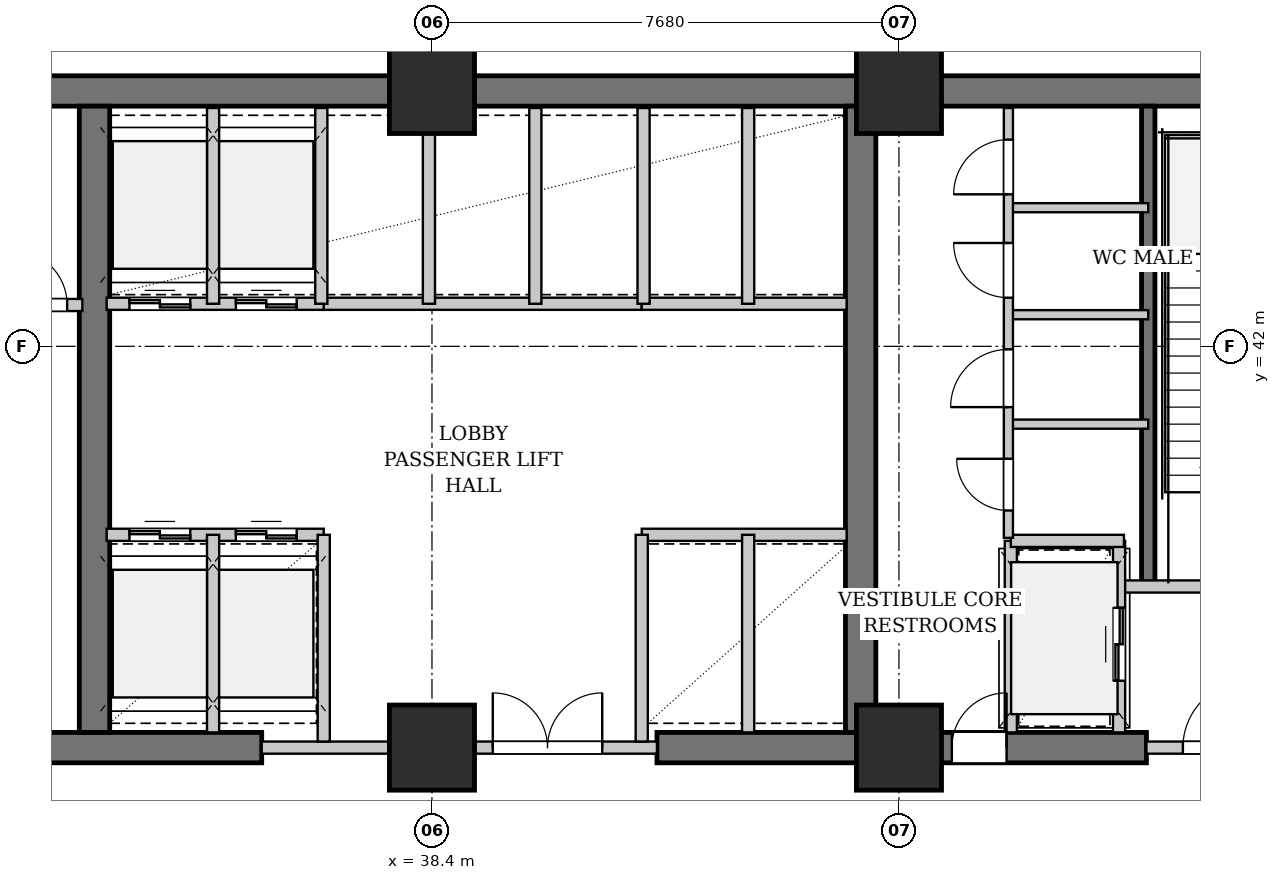
"""IFC4 building model, lengths in metres.
Left out: names, types, materials, properties, quantities, classifications, styles, units other than length and angle.
Written with IfcOpenShell. Run it as: python <this file> out.ifc"""

import sys

from ifc_helpers import new_model, si_unit, direction, frame, frame_2d, origin, origin_2d, place, context, subcontext, project, spatial, rectangle, extrude, element, fill, save


model = new_model("IFC4")
c1 = context("Model", 3, precision=1e-05, world=origin(), true_north=direction((0.0, 1.0)))
c2 = subcontext(c1, "Body", "Model", "MODEL_VIEW")
j1 = project(units=[si_unit("LENGTHUNIT", "METRE"), si_unit("PLANEANGLEUNIT", "RADIAN")], contexts=[c1])
p1 = place(None, origin())
s1 = spatial("IfcSite", under=j1, at=p1, CompositionType="ELEMENT")
p2 = place(p1, origin())
s2 = spatial("IfcBuilding", under=s1, at=p2, CompositionType="ELEMENT")
p3 = place(p2, frame((0.0, 0.0, 25.2)))
s3 = spatial("IfcBuildingStorey", under=s2, at=p3, CompositionType="ELEMENT", Elevation=25.2)
p4 = place(p3, frame((22.79, 46.2, 0.0), z_axis=(0.0, 0.0, 1.0), x_axis=(1.0, 0.0, 0.0)))
e1 = element("IfcWall", 1, at=p4, inside=s3, PredefinedType="SHEAR", context=c2, shape_type="SweptSolid", body=[
    extrude(rectangle(XDim=31.22, YDim=0.5, at=frame_2d((15.61, 0.0))), origin(), (0.0, 0.0, 1.0), 4.78),
])
p5 = place(p3, frame((30.72, 35.4, 0.0), z_axis=(0.0, 0.0, 1.0), x_axis=(1.0, 0.0, 0.0)))
e2 = element("IfcWall", 2, at=p5, inside=s3, PredefinedType="SHEAR", context=c2, shape_type="SweptSolid", body=[
    extrude(rectangle(XDim=4.88, YDim=0.5, at=frame_2d((2.44, 0.0))), origin(), (0.0, 0.0, 1.0), 4.78),
])
p6 = place(p3, frame((42.1, 35.4, 0.0), z_axis=(0.0, 0.0, 1.0), x_axis=(1.0, 0.0, 0.0)))
e3 = element("IfcWall", 3, at=p6, inside=s3, PredefinedType="SHEAR", context=c2, shape_type="SweptSolid", body=[
    extrude(rectangle(XDim=8.05, YDim=0.5, at=frame_2d((4.025, 0.0))), origin(), (0.0, 0.0, 1.0), 4.78),
])
p7 = place(p6, frame((4.85, 0.0, 0.0)))
e4 = element("IfcOpeningElement", 4, at=p7, cuts=e3, PredefinedType="OPENING", context=c2, shape_type="SweptSolid", body=[
    extrude(rectangle(XDim=0.9, YDim=2.15, at=frame_2d((0.45, 1.075))), frame((0.0, 0.26, 0.0), z_axis=(0.0, -1.0, 0.0), x_axis=(1.0, 0.0, 0.0)), (0.0, 0.0, 1.0), 0.52),
])
for number, where, z_axis, x_axis in (
    (5, (32.85, 35.65, 0.0), (0.0, 0.0, 1.0), (0.0, 1.0, 0.0)),
    (6, (45.45, 35.65, 0.0), (0.0, 0.0, 1.0), (0.0, 1.0, 0.0)),
):
    element("IfcWall", number, at=place(p3, frame(where, z_axis=z_axis, x_axis=x_axis)), inside=s3, PredefinedType="SHEAR", context=c2, shape_type="SweptSolid", body=[
        extrude(rectangle(XDim=10.3, YDim=0.5, at=frame_2d((5.15, 0.0))), origin(), (0.0, 0.0, 1.0), 4.78),
    ])
p8 = place(p3, frame((50.18, 38.05, 0.0), z_axis=(0.0, 0.0, 1.0), x_axis=(0.0, 1.0, 0.0)))
e7 = element("IfcWall", 7, at=p8, inside=s3, PredefinedType="SHEAR", context=c2, shape_type="SweptSolid", body=[
    extrude(rectangle(XDim=7.9, YDim=0.22, at=frame_2d((3.95, 0.0))), origin(), (0.0, 0.0, 1.0), 4.78),
])
for number, where, z_axis, x_axis in (
    (8, (38.4, 35.4, 0.0), (0.0, 0.0, 1.0), (1.0, 0.0, 0.0)),
    (9, (38.4, 46.2, 0.0), (0.0, 0.0, 1.0), (1.0, 0.0, 0.0)),
    (10, (46.08, 35.4, 0.0), (0.0, 0.0, 1.0), (1.0, 0.0, 0.0)),
    (11, (46.08, 46.2, 0.0), (0.0, 0.0, 1.0), (1.0, 0.0, 0.0)),
):
    element("IfcColumn", number, at=place(p3, frame(where, z_axis=z_axis, x_axis=x_axis)), inside=s3, PredefinedType="COLUMN", context=c2, shape_type="SweptSolid", body=[
        extrude(rectangle(XDim=1.4, YDim=1.4, at=origin_2d()), origin(), (0.0, 0.0, 1.0), 5.2),
    ])
p9 = place(p3, frame((27.32, 42.68, 0.0), z_axis=(0.0, 0.0, 1.0), x_axis=(1.0, 0.0, 0.0)))
e12 = element("IfcWall", 12, at=p9, inside=s3, PredefinedType="PARTITIONING", context=c2, shape_type="SweptSolid", body=[
    extrude(rectangle(XDim=5.33, YDim=0.2, at=frame_2d((2.665, 0.0))), origin(), (0.0, 0.0, 1.0), 4.78),
])
p10 = place(p9, frame((4.18, 0.0, 0.0)))
e13 = element("IfcOpeningElement", 13, at=p10, cuts=e12, PredefinedType="OPENING", context=c2, shape_type="SweptSolid", body=[
    extrude(rectangle(XDim=0.9, YDim=2.15, at=frame_2d((0.45, 1.075))), frame((0.0, 0.11, 0.0), z_axis=(0.0, -1.0, 0.0), x_axis=(1.0, 0.0, 0.0)), (0.0, 0.0, 1.0), 0.22),
])
p11 = place(p3, frame((35.6, 35.4, 0.0), z_axis=(0.0, 0.0, 1.0), x_axis=(1.0, 0.0, 0.0)))
e14 = element("IfcWall", 14, at=p11, inside=s3, PredefinedType="PARTITIONING", context=c2, shape_type="SweptSolid", body=[
    extrude(rectangle(XDim=6.5, YDim=0.2, at=frame_2d((3.25, 0.0))), origin(), (0.0, 0.0, 1.0), 3.767),
])
p12 = place(p11, frame((3.8, 0.0, 0.0)))
e15 = element("IfcOpeningElement", 15, at=p12, cuts=e14, PredefinedType="OPENING", context=c2, shape_type="SweptSolid", body=[
    extrude(rectangle(XDim=1.8, YDim=2.3, at=frame_2d((0.9, 1.15))), frame((0.0, 0.11, 0.0), z_axis=(0.0, -1.0, 0.0), x_axis=(1.0, 0.0, 0.0)), (0.0, 0.0, 1.0), 0.22),
])
p13 = place(p3, frame((36.6, 42.7, 0.0), z_axis=(0.0, 0.0, 1.0), x_axis=(1.0, 0.0, 0.0)))
e16 = element("IfcWall", 16, at=p13, inside=s3, PredefinedType="PARTITIONING", context=c2, shape_type="SweptSolid", body=[
    extrude(rectangle(XDim=5.25, YDim=0.2, at=frame_2d((2.625, 0.0))), origin(), (0.0, 0.0, 1.0), 4.78),
])
p14 = place(p3, frame((38.35, 42.7, 0.0), z_axis=(0.0, 0.0, 1.0), x_axis=(0.0, 1.0, 0.0)))
e17 = element("IfcWall", 17, at=p14, inside=s3, PredefinedType="PARTITIONING", context=c2, shape_type="SweptSolid", body=[
    extrude(rectangle(XDim=3.22, YDim=0.2, at=frame_2d((1.61, 0.0))), origin(), (0.0, 0.0, 1.0), 3.767),
])
p15 = place(p3, frame((40.1, 42.7, 0.0), z_axis=(0.0, 0.0, 1.0), x_axis=(0.0, 1.0, 0.0)))
e18 = element("IfcWall", 18, at=p15, inside=s3, PredefinedType="PARTITIONING", context=c2, shape_type="SweptSolid", body=[
    extrude(rectangle(XDim=3.22, YDim=0.2, at=frame_2d((1.61, 0.0))), origin(), (0.0, 0.0, 1.0), 4.78),
])
p16 = place(p3, frame((33.05, 38.9, 0.0), z_axis=(0.0, 0.0, 1.0), x_axis=(1.0, 0.0, 0.0)))
e19 = element("IfcWall", 19, at=p16, inside=s3, PredefinedType="PARTITIONING", context=c2, shape_type="SweptSolid", body=[
    extrude(rectangle(XDim=3.57, YDim=0.2, at=frame_2d((1.785, 0.0))), origin(), (0.0, 0.0, 1.0), 4.78),
])
p17 = place(p16, frame((0.375, 0.0, 0.0)))
e20 = element("IfcOpeningElement", 20, at=p17, cuts=e19, PredefinedType="OPENING", context=c2, shape_type="SweptSolid", body=[
    extrude(rectangle(XDim=1.0, YDim=2.2, at=frame_2d((0.5, 1.1))), frame((0.0, 0.11, 0.0), z_axis=(0.0, -1.0, 0.0), x_axis=(1.0, 0.0, 0.0)), (0.0, 0.0, 1.0), 0.22),
])
p18 = place(p16, frame((2.125, 0.0, 0.0)))
e21 = element("IfcOpeningElement", 21, at=p18, cuts=e19, PredefinedType="OPENING", context=c2, shape_type="SweptSolid", body=[
    extrude(rectangle(XDim=1.0, YDim=2.2, at=frame_2d((0.5, 1.1))), frame((0.0, 0.11, 0.0), z_axis=(0.0, -1.0, 0.0), x_axis=(1.0, 0.0, 0.0)), (0.0, 0.0, 1.0), 0.22),
])
p19 = place(p3, frame((33.05, 42.7, 0.0), z_axis=(0.0, 0.0, 1.0), x_axis=(1.0, 0.0, 0.0)))
e22 = element("IfcWall", 22, at=p19, inside=s3, PredefinedType="PARTITIONING", context=c2, shape_type="SweptSolid", body=[
    extrude(rectangle(XDim=3.57, YDim=0.2, at=frame_2d((1.785, 0.0))), origin(), (0.0, 0.0, 1.0), 4.78),
])
p20 = place(p19, frame((0.375, 0.0, 0.0)))
e23 = element("IfcOpeningElement", 23, at=p20, cuts=e22, PredefinedType="OPENING", context=c2, shape_type="SweptSolid", body=[
    extrude(rectangle(XDim=1.0, YDim=2.2, at=frame_2d((0.5, 1.1))), frame((0.0, 0.11, 0.0), z_axis=(0.0, -1.0, 0.0), x_axis=(1.0, 0.0, 0.0)), (0.0, 0.0, 1.0), 0.22),
])
p21 = place(p19, frame((2.125, 0.0, 0.0)))
e24 = element("IfcOpeningElement", 24, at=p21, cuts=e22, PredefinedType="OPENING", context=c2, shape_type="SweptSolid", body=[
    extrude(rectangle(XDim=1.0, YDim=2.2, at=frame_2d((0.5, 1.1))), frame((0.0, 0.11, 0.0), z_axis=(0.0, -1.0, 0.0), x_axis=(1.0, 0.0, 0.0)), (0.0, 0.0, 1.0), 0.22),
])
p22 = place(p3, frame((34.8, 35.65, 0.0), z_axis=(0.0, 0.0, 1.0), x_axis=(0.0, 1.0, 0.0)))
e25 = element("IfcWall", 25, at=p22, inside=s3, PredefinedType="PARTITIONING", context=c2, shape_type="SweptSolid", body=[
    extrude(rectangle(XDim=3.25, YDim=0.2, at=frame_2d((1.625, 0.0))), origin(), (0.0, 0.0, 1.0), 4.78),
])
p23 = place(p3, frame((34.8, 42.7, 0.0), z_axis=(0.0, 0.0, 1.0), x_axis=(0.0, 1.0, 0.0)))
e26 = element("IfcWall", 26, at=p23, inside=s3, PredefinedType="PARTITIONING", context=c2, shape_type="SweptSolid", body=[
    extrude(rectangle(XDim=3.22, YDim=0.2, at=frame_2d((1.61, 0.0))), origin(), (0.0, 0.0, 1.0), 4.78),
])
p24 = place(p3, frame((36.62, 35.5, 0.0), z_axis=(0.0, 0.0, 1.0), x_axis=(0.0, 1.0, 0.0)))
e27 = element("IfcWall", 27, at=p24, inside=s3, PredefinedType="PARTITIONING", context=c2, shape_type="SweptSolid", body=[
    extrude(rectangle(XDim=3.4, YDim=0.2, at=frame_2d((1.7, 0.0))), origin(), (0.0, 0.0, 1.0), 4.78),
])
p25 = place(p3, frame((36.58, 42.7, 0.0), z_axis=(0.0, 0.0, 1.0), x_axis=(0.0, 1.0, 0.0)))
e28 = element("IfcWall", 28, at=p25, inside=s3, PredefinedType="PARTITIONING", context=c2, shape_type="SweptSolid", body=[
    extrude(rectangle(XDim=3.22, YDim=0.2, at=frame_2d((1.61, 0.0))), origin(), (0.0, 0.0, 1.0), 4.78),
])
for number, where, z_axis, x_axis in (
    (29, (41.85, 38.9, 0.0), (0.0, 0.0, 1.0), (1.0, 0.0, 0.0)),
    (30, (41.85, 42.7, 0.0), (0.0, 0.0, 1.0), (1.0, 0.0, 0.0)),
):
    element("IfcWall", number, at=place(p3, frame(where, z_axis=z_axis, x_axis=x_axis)), inside=s3, PredefinedType="PARTITIONING", context=c2, shape_type="SweptSolid", body=[
        extrude(rectangle(XDim=3.37, YDim=0.2, at=frame_2d((1.685, 0.0))), origin(), (0.0, 0.0, 1.0), 4.78),
    ])
p26 = place(p3, frame((43.6, 35.65, 0.0), z_axis=(0.0, 0.0, 1.0), x_axis=(0.0, 1.0, 0.0)))
e31 = element("IfcWall", 31, at=p26, inside=s3, PredefinedType="PARTITIONING", context=c2, shape_type="SweptSolid", body=[
    extrude(rectangle(XDim=3.25, YDim=0.2, at=frame_2d((1.625, 0.0))), origin(), (0.0, 0.0, 1.0), 4.78),
])
p27 = place(p3, frame((43.6, 42.7, 0.0), z_axis=(0.0, 0.0, 1.0), x_axis=(0.0, 1.0, 0.0)))
e32 = element("IfcWall", 32, at=p27, inside=s3, PredefinedType="PARTITIONING", context=c2, shape_type="SweptSolid", body=[
    extrude(rectangle(XDim=3.22, YDim=0.2, at=frame_2d((1.61, 0.0))), origin(), (0.0, 0.0, 1.0), 4.78),
])
p28 = place(p3, frame((41.85, 35.5, 0.0), z_axis=(0.0, 0.0, 1.0), x_axis=(0.0, 1.0, 0.0)))
e33 = element("IfcWall", 33, at=p28, inside=s3, PredefinedType="PARTITIONING", context=c2, shape_type="SweptSolid", body=[
    extrude(rectangle(XDim=3.4, YDim=0.2, at=frame_2d((1.7, 0.0))), origin(), (0.0, 0.0, 1.0), 4.78),
])
p29 = place(p3, frame((41.88, 42.7, 0.0), z_axis=(0.0, 0.0, 1.0), x_axis=(0.0, 1.0, 0.0)))
e34 = element("IfcWall", 34, at=p29, inside=s3, PredefinedType="PARTITIONING", context=c2, shape_type="SweptSolid", body=[
    extrude(rectangle(XDim=3.22, YDim=0.2, at=frame_2d((1.61, 0.0))), origin(), (0.0, 0.0, 1.0), 4.78),
])
p30 = place(p3, frame((49.78, 38.05, 0.0), z_axis=(0.0, 0.0, 1.0), x_axis=(1.0, 0.0, 0.0)))
e35 = element("IfcWall", 35, at=p30, inside=s3, PredefinedType="PARTITIONING", context=c2, shape_type="SweptSolid", body=[
    extrude(rectangle(XDim=3.72, YDim=0.2, at=frame_2d((1.86, 0.0))), origin(), (0.0, 0.0, 1.0), 4.78),
])
p31 = place(p30, frame((1.436, 0.0, 0.0)))
e36 = element("IfcOpeningElement", 36, at=p31, cuts=e35, PredefinedType="OPENING", context=c2, shape_type="SweptSolid", body=[
    extrude(rectangle(XDim=1.1, YDim=2.15, at=frame_2d((0.55, 1.075))), frame((0.0, 0.11, 0.0), z_axis=(0.0, -1.0, 0.0), x_axis=(1.0, 0.0, 0.0)), (0.0, 0.0, 1.0), 0.22),
])
p32 = place(p3, frame((50.15, 35.4, 0.0), z_axis=(0.0, 0.0, 1.0), x_axis=(1.0, 0.0, 0.0)))
e37 = element("IfcWall", 37, at=p32, inside=s3, PredefinedType="PARTITIONING", context=c2, shape_type="SweptSolid", body=[
    extrude(rectangle(XDim=2.3, YDim=0.2, at=frame_2d((1.15, 0.0))), origin(), (0.0, 0.0, 1.0), 3.767),
])
p33 = place(p32, frame((0.6, 0.0, 0.0)))
e38 = element("IfcOpeningElement", 38, at=p33, cuts=e37, PredefinedType="OPENING", context=c2, shape_type="SweptSolid", body=[
    extrude(rectangle(XDim=1.1, YDim=2.15, at=frame_2d((0.55, 1.075))), frame((0.0, 0.11, 0.0), z_axis=(0.0, -1.0, 0.0), x_axis=(1.0, 0.0, 0.0)), (0.0, 0.0, 1.0), 0.22),
])
p34 = place(p3, frame((49.7, 35.65, 0.0), z_axis=(0.0, 0.0, 1.0), x_axis=(0.0, 1.0, 0.0)))
e39 = element("IfcWall", 39, at=p34, inside=s3, PredefinedType="PARTITIONING", context=c2, shape_type="SweptSolid", body=[
    extrude(rectangle(XDim=3.15, YDim=0.2, at=frame_2d((1.575, 0.0))), origin(), (0.0, 0.0, 1.0), 4.78),
])
p35 = place(p34, frame((0.85, 0.0, 0.0)))
e40 = element("IfcOpeningElement", 40, at=p35, cuts=e39, PredefinedType="OPENING", context=c2, shape_type="SweptSolid", body=[
    extrude(rectangle(XDim=1.2, YDim=2.2, at=frame_2d((0.6, 1.1))), frame((0.0, 0.11, 0.0), z_axis=(0.0, -1.0, 0.0), x_axis=(1.0, 0.0, 0.0)), (0.0, 0.0, 1.0), 0.22),
])
p36 = place(p3, frame((47.92, 35.65, 0.0), z_axis=(0.0, 0.0, 1.0), x_axis=(0.0, 1.0, 0.0)))
e41 = element("IfcWall", 41, at=p36, inside=s3, PredefinedType="PARTITIONING", context=c2, shape_type="SweptSolid", body=[
    extrude(rectangle(XDim=3.15, YDim=0.2, at=frame_2d((1.575, 0.0))), origin(), (0.0, 0.0, 1.0), 4.78),
])
p37 = place(p3, frame((47.92, 38.8, 0.0), z_axis=(0.0, 0.0, 1.0), x_axis=(1.0, 0.0, 0.0)))
e42 = element("IfcWall", 42, at=p37, inside=s3, PredefinedType="PARTITIONING", context=c2, shape_type="SweptSolid", body=[
    extrude(rectangle(XDim=1.86, YDim=0.2, at=frame_2d((0.93, 0.0))), origin(), (0.0, 0.0, 1.0), 4.78),
])
for number, where, z_axis, x_axis in (
    (43, (47.88, 40.72, 0.0), (0.0, 0.0, 1.0), (1.0, 0.0, 0.0)),
    (44, (47.88, 42.52, 0.0), (0.0, 0.0, 1.0), (1.0, 0.0, 0.0)),
    (45, (47.88, 44.28, 0.0), (0.0, 0.0, 1.0), (1.0, 0.0, 0.0)),
):
    element("IfcWall", number, at=place(p3, frame(where, z_axis=z_axis, x_axis=x_axis)), inside=s3, PredefinedType="PARTITIONING", context=c2, shape_type="SweptSolid", body=[
        extrude(rectangle(XDim=2.3, YDim=0.15, at=frame_2d((1.15, 0.0))), origin(), (0.0, 0.0, 1.0), 4.78),
    ])
p38 = place(p3, frame((47.88, 38.85, 0.0), z_axis=(0.0, 0.0, 1.0), x_axis=(0.0, 1.0, 0.0)))
e46 = element("IfcWall", 46, at=p38, inside=s3, PredefinedType="PARTITIONING", context=c2, shape_type="SweptSolid", body=[
    extrude(rectangle(XDim=7.07, YDim=0.15, at=frame_2d((3.535, 0.0))), origin(), (0.0, 0.0, 1.0), 4.78),
])
p39 = place(p38, frame((0.45, 0.0, 0.0)))
e47 = element("IfcOpeningElement", 47, at=p39, cuts=e46, PredefinedType="OPENING", context=c2, shape_type="SweptSolid", body=[
    extrude(rectangle(XDim=0.85, YDim=2.15, at=frame_2d((0.425, 1.075))), frame((0.0, 0.085, 0.0), z_axis=(0.0, -1.0, 0.0), x_axis=(1.0, 0.0, 0.0)), (0.0, 0.0, 1.0), 0.17),
])
p40 = place(p38, frame((2.15, 0.0, 0.0)))
e48 = element("IfcOpeningElement", 48, at=p40, cuts=e46, PredefinedType="OPENING", context=c2, shape_type="SweptSolid", body=[
    extrude(rectangle(XDim=0.95, YDim=2.15, at=frame_2d((0.475, 1.075))), frame((0.0, 0.085, 0.0), z_axis=(0.0, -1.0, 0.0), x_axis=(1.0, 0.0, 0.0)), (0.0, 0.0, 1.0), 0.17),
])
p41 = place(p38, frame((3.95, 0.0, 0.0)))
e49 = element("IfcOpeningElement", 49, at=p41, cuts=e46, PredefinedType="OPENING", context=c2, shape_type="SweptSolid", body=[
    extrude(rectangle(XDim=0.9, YDim=2.15, at=frame_2d((0.45, 1.075))), frame((0.0, 0.085, 0.0), z_axis=(0.0, -1.0, 0.0), x_axis=(1.0, 0.0, 0.0)), (0.0, 0.0, 1.0), 0.17),
])
p42 = place(p38, frame((5.65, 0.0, 0.0)))
e50 = element("IfcOpeningElement", 50, at=p42, cuts=e46, PredefinedType="OPENING", context=c2, shape_type="SweptSolid", body=[
    extrude(rectangle(XDim=0.9, YDim=2.15, at=frame_2d((0.45, 1.075))), frame((0.0, 0.085, 0.0), z_axis=(0.0, -1.0, 0.0), x_axis=(1.0, 0.0, 0.0)), (0.0, 0.0, 1.0), 0.17),
])
p43 = place(p10, origin())
e51 = element("IfcDoor", 51, at=p43, inside=s3, OperationType="SINGLE_SWING_LEFT", PredefinedType="DOOR", context=c2, shape_type="SweptSolid", body=[
    extrude(rectangle(XDim=0.9, YDim=2.15, at=frame_2d((0.45, 1.075))), frame((0.0, 0.025, 0.0), z_axis=(0.0, -1.0, 0.0), x_axis=(1.0, 0.0, 0.0)), (0.0, 0.0, 1.0), 0.05),
])
fill(e13, e51)
p44 = place(p12, origin())
e52 = element("IfcDoor", 52, at=p44, inside=s3, OperationType="DOUBLE_DOOR_SINGLE_SWING", PredefinedType="DOOR", context=c2, shape_type="SweptSolid", body=[
    extrude(rectangle(XDim=1.8, YDim=2.3, at=frame_2d((0.9, 1.15))), frame((0.0, 0.025, 0.0), z_axis=(0.0, -1.0, 0.0), x_axis=(1.0, 0.0, 0.0)), (0.0, 0.0, 1.0), 0.05),
])
fill(e15, e52)
p45 = place(p17, origin())
e53 = element("IfcDoor", 53, at=p45, inside=s3, OperationType="DOUBLE_DOOR_SLIDING", PredefinedType="DOOR", context=c2, shape_type="SweptSolid", body=[
    extrude(rectangle(XDim=1.0, YDim=2.2, at=frame_2d((0.5, 1.1))), frame((0.0, 0.025, 0.0), z_axis=(0.0, -1.0, 0.0), x_axis=(1.0, 0.0, 0.0)), (0.0, 0.0, 1.0), 0.05),
])
fill(e20, e53)
p46 = place(p18, origin())
e54 = element("IfcDoor", 54, at=p46, inside=s3, OperationType="DOUBLE_DOOR_SLIDING", PredefinedType="DOOR", context=c2, shape_type="SweptSolid", body=[
    extrude(rectangle(XDim=1.0, YDim=2.2, at=frame_2d((0.5, 1.1))), frame((0.0, 0.025, 0.0), z_axis=(0.0, -1.0, 0.0), x_axis=(1.0, 0.0, 0.0)), (0.0, 0.0, 1.0), 0.05),
])
fill(e21, e54)
p47 = place(p20, origin())
e55 = element("IfcDoor", 55, at=p47, inside=s3, OperationType="DOUBLE_DOOR_SLIDING", PredefinedType="DOOR", context=c2, shape_type="SweptSolid", body=[
    extrude(rectangle(XDim=1.0, YDim=2.2, at=frame_2d((0.5, 1.1))), frame((0.0, 0.025, 0.0), z_axis=(0.0, -1.0, 0.0), x_axis=(1.0, 0.0, 0.0)), (0.0, 0.0, 1.0), 0.05),
])
fill(e23, e55)
p48 = place(p21, origin())
e56 = element("IfcDoor", 56, at=p48, inside=s3, OperationType="DOUBLE_DOOR_SLIDING", PredefinedType="DOOR", context=c2, shape_type="SweptSolid", body=[
    extrude(rectangle(XDim=1.0, YDim=2.2, at=frame_2d((0.5, 1.1))), frame((0.0, 0.025, 0.0), z_axis=(0.0, -1.0, 0.0), x_axis=(1.0, 0.0, 0.0)), (0.0, 0.0, 1.0), 0.05),
])
fill(e24, e56)
p49 = place(p33, origin())
e57 = element("IfcDoor", 57, at=p49, inside=s3, OperationType="SINGLE_SWING_RIGHT", PredefinedType="DOOR", context=c2, shape_type="SweptSolid", body=[
    extrude(rectangle(XDim=1.1, YDim=2.15, at=frame_2d((0.55, 1.075))), frame((0.0, 0.025, 0.0), z_axis=(0.0, -1.0, 0.0), x_axis=(1.0, 0.0, 0.0)), (0.0, 0.0, 1.0), 0.05),
])
fill(e38, e57)
p50 = place(p35, origin())
e58 = element("IfcDoor", 58, at=p50, inside=s3, OperationType="DOUBLE_DOOR_SLIDING", PredefinedType="DOOR", context=c2, shape_type="SweptSolid", body=[
    extrude(rectangle(XDim=1.2, YDim=2.2, at=frame_2d((0.6, 1.1))), frame((0.0, 0.025, 0.0), z_axis=(0.0, -1.0, 0.0), x_axis=(1.0, 0.0, 0.0)), (0.0, 0.0, 1.0), 0.05),
])
fill(e40, e58)
p51 = place(p39, origin())
e59 = element("IfcDoor", 59, at=p51, inside=s3, OperationType="SINGLE_SWING_RIGHT", PredefinedType="DOOR", context=c2, shape_type="SweptSolid", body=[
    extrude(rectangle(XDim=0.85, YDim=2.15, at=frame_2d((0.425, 1.075))), frame((0.0, 0.025, 0.0), z_axis=(0.0, -1.0, 0.0), x_axis=(1.0, 0.0, 0.0)), (0.0, 0.0, 1.0), 0.05),
])
fill(e47, e59)
p52 = place(p40, origin())
e60 = element("IfcDoor", 60, at=p52, inside=s3, OperationType="SINGLE_SWING_LEFT", PredefinedType="DOOR", context=c2, shape_type="SweptSolid", body=[
    extrude(rectangle(XDim=0.95, YDim=2.15, at=frame_2d((0.475, 1.075))), frame((0.0, 0.025, 0.0), z_axis=(0.0, -1.0, 0.0), x_axis=(1.0, 0.0, 0.0)), (0.0, 0.0, 1.0), 0.05),
])
fill(e48, e60)
p53 = place(p41, origin())
e61 = element("IfcDoor", 61, at=p53, inside=s3, OperationType="SINGLE_SWING_RIGHT", PredefinedType="DOOR", context=c2, shape_type="SweptSolid", body=[
    extrude(rectangle(XDim=0.9, YDim=2.15, at=frame_2d((0.45, 1.075))), frame((0.0, 0.025, 0.0), z_axis=(0.0, -1.0, 0.0), x_axis=(1.0, 0.0, 0.0)), (0.0, 0.0, 1.0), 0.05),
])
fill(e49, e61)
p54 = place(p42, origin())
e62 = element("IfcDoor", 62, at=p54, inside=s3, OperationType="SINGLE_SWING_LEFT", PredefinedType="DOOR", context=c2, shape_type="SweptSolid", body=[
    extrude(rectangle(XDim=0.9, YDim=2.15, at=frame_2d((0.45, 1.075))), frame((0.0, 0.025, 0.0), z_axis=(0.0, -1.0, 0.0), x_axis=(1.0, 0.0, 0.0)), (0.0, 0.0, 1.0), 0.05),
])
fill(e50, e62)
p55 = place(p7, origin())
e63 = element("IfcDoor", 63, at=p55, inside=s3, OperationType="SINGLE_SWING_RIGHT", PredefinedType="DOOR", context=c2, shape_type="SweptSolid", body=[
    extrude(rectangle(XDim=0.9, YDim=2.15, at=frame_2d((0.45, 1.075))), frame((0.0, 0.025, 0.0), z_axis=(0.0, -1.0, 0.0), x_axis=(1.0, 0.0, 0.0)), (0.0, 0.0, 1.0), 0.05),
])
fill(e4, e63)
save(model, sys.argv[1])
